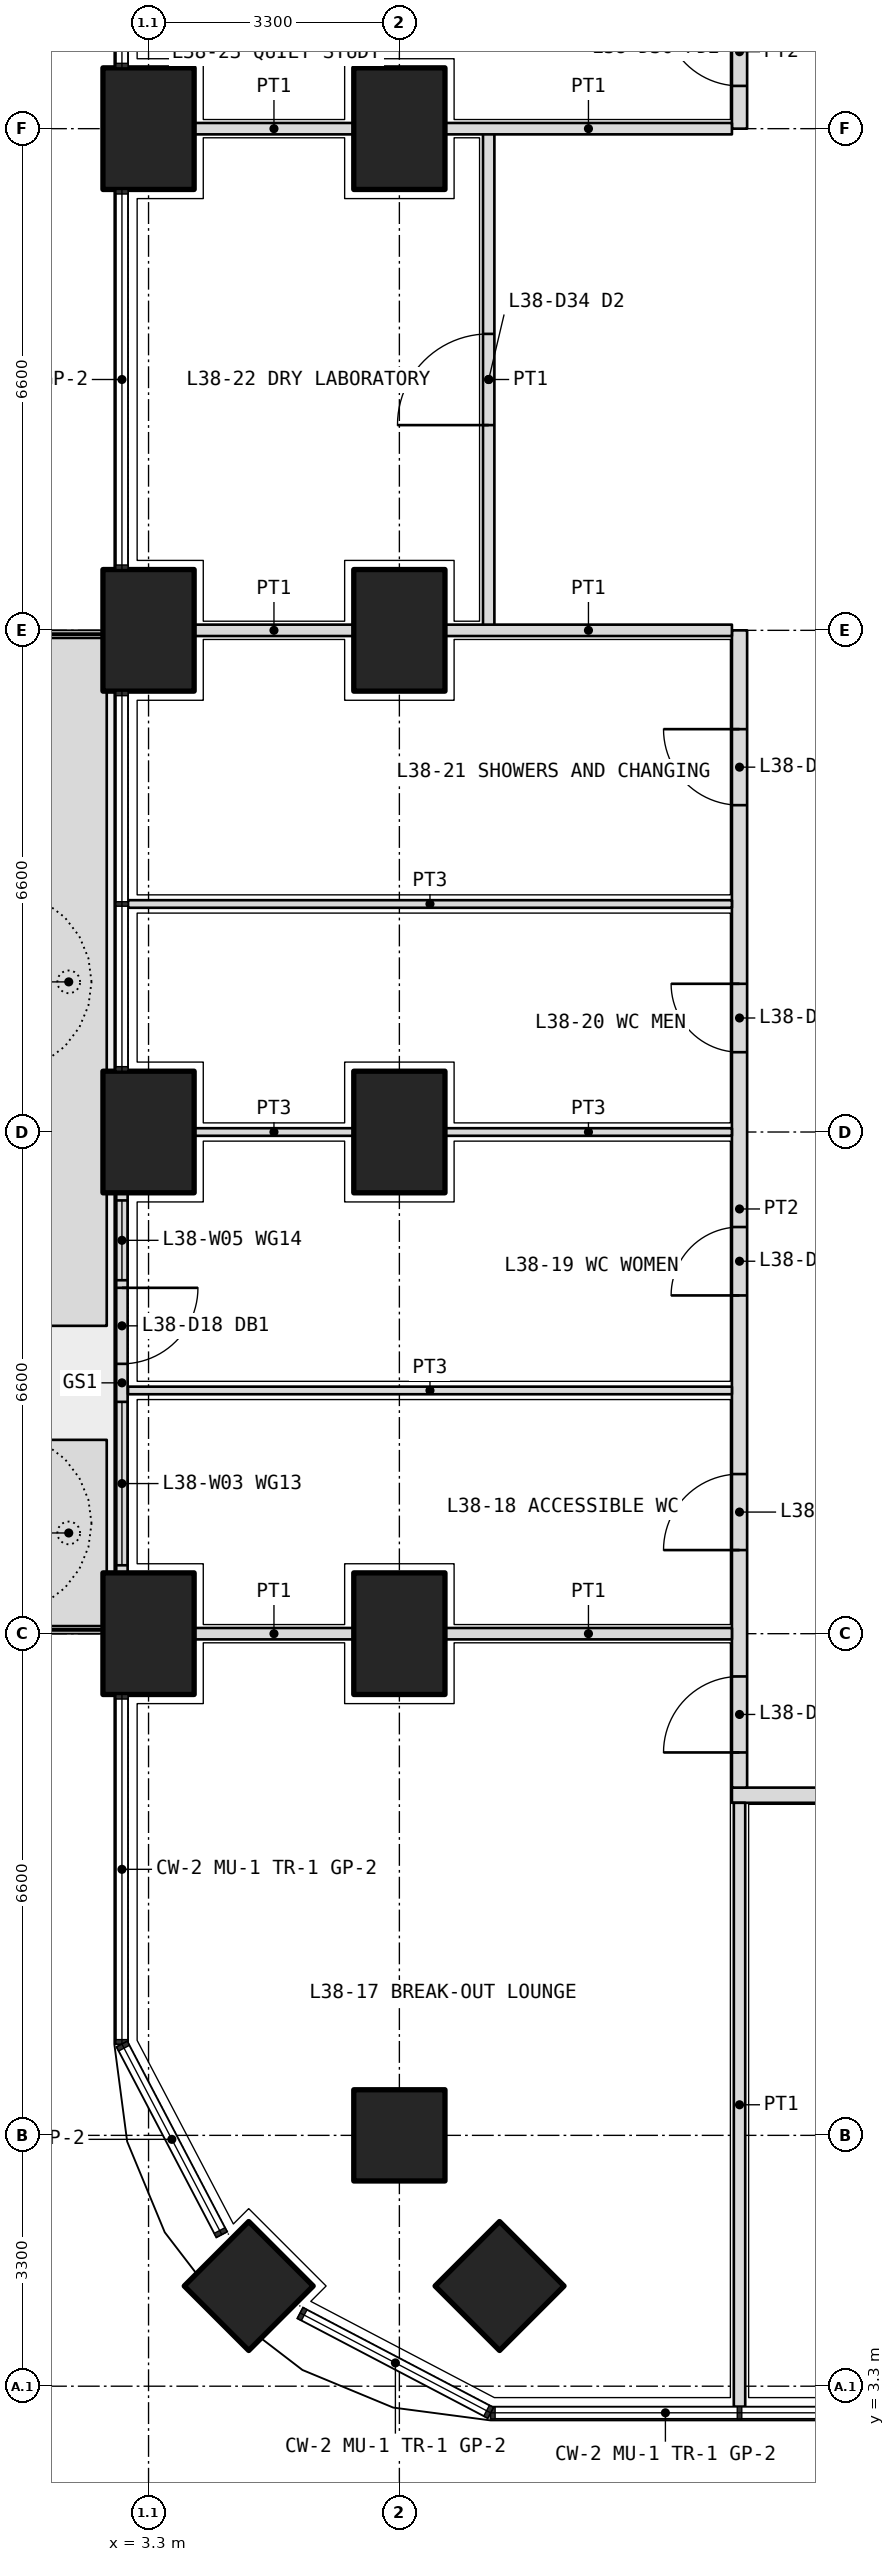
"""IFC4 building model, lengths in metres.
Left out: names, types, materials, properties, quantities, classifications, styles, units other than length and angle.
Written with IfcOpenShell. Run it as: python <this file> out.ifc"""

import sys

from ifc_helpers import new_model, si_unit, direction, frame, frame_2d, origin, origin_2d, place, context, subcontext, project, spatial, polyline, rectangle, outline, extrude, element, fill, save


model = new_model("IFC4")
c1 = context("Model", 3, precision=1e-05, world=origin(), true_north=direction((0.0, 1.0)))
c2 = subcontext(c1, "Body", "Model", "MODEL_VIEW")
j1 = project(units=[si_unit("LENGTHUNIT", "METRE"), si_unit("PLANEANGLEUNIT", "RADIAN")], contexts=[c1])
p1 = place(None, origin())
s1 = spatial("IfcSite", under=j1, at=p1, CompositionType="ELEMENT")
p2 = place(p1, origin())
s2 = spatial("IfcBuilding", under=s1, at=p2, CompositionType="ELEMENT")
p3 = place(p2, frame((0.0, 0.0, 168.3)))
s3 = spatial("IfcBuildingStorey", under=s2, at=p3, CompositionType="ELEMENT", Elevation=168.3)
p4 = place(p3, frame((4.618, 4.618, 0.0), z_axis=(0.0, 0.0, 1.0), x_axis=(0.707106781187, 0.707106781187, 0.0)))
e1 = element("IfcColumn", 1, at=p4, inside=s3, PredefinedType="COLUMN", context=c2, shape_type="SweptSolid", body=[
    extrude(rectangle(XDim=1.2, YDim=1.2, at=origin_2d()), origin(), (0.0, 0.0, 1.0), 4.2),
])
for number, where, z_axis, x_axis in (
    (2, (3.3, 13.2, 0.0), (0.0, 0.0, 1.0), (0.0, 1.0, 0.0)),
    (3, (3.3, 19.8, 0.0), (0.0, 0.0, 1.0), (0.0, 1.0, 0.0)),
    (4, (3.3, 26.4, 0.0), (0.0, 0.0, 1.0), (0.0, 1.0, 0.0)),
    (5, (3.3, 33.0, 0.0), (0.0, 0.0, 1.0), (0.0, 1.0, 0.0)),
):
    element("IfcColumn", number, at=place(p3, frame(where, z_axis=z_axis, x_axis=x_axis)), inside=s3, PredefinedType="COLUMN", context=c2, shape_type="SweptSolid", body=[
        extrude(rectangle(XDim=1.6, YDim=1.2, at=origin_2d()), origin(), (0.0, 0.0, 1.0), 4.2),
    ])
for number, where, z_axis, x_axis in (
    (6, (6.6, 6.6, 0.0), (0.0, 0.0, 1.0), (1.0, 0.0, 0.0)),
    (7, (7.918, 4.618, 0.0), (0.0, 0.0, 1.0), (0.707, 0.707, 0.0)),
):
    element("IfcColumn", number, at=place(p3, frame(where, z_axis=z_axis, x_axis=x_axis)), inside=s3, PredefinedType="COLUMN", context=c2, shape_type="SweptSolid", body=[
        extrude(rectangle(XDim=1.2, YDim=1.2, at=origin_2d()), origin(), (0.0, 0.0, 1.0), 4.2),
    ])
for number, where, z_axis, x_axis in (
    (8, (6.6, 13.2, 0.0), (0.0, 0.0, 1.0), (0.0, 1.0, 0.0)),
    (9, (6.6, 19.8, 0.0), (0.0, 0.0, 1.0), (0.0, 1.0, 0.0)),
    (10, (6.6, 26.4, 0.0), (0.0, 0.0, 1.0), (0.0, 1.0, 0.0)),
    (11, (6.6, 33.0, 0.0), (0.0, 0.0, 1.0), (0.0, 1.0, 0.0)),
):
    element("IfcColumn", number, at=place(p3, frame(where, z_axis=z_axis, x_axis=x_axis)), inside=s3, PredefinedType="COLUMN", context=c2, shape_type="SweptSolid", body=[
        extrude(rectangle(XDim=1.6, YDim=1.2, at=origin_2d()), origin(), (0.0, 0.0, 1.0), 4.2),
    ])
p5 = place(p3, origin())
e12 = element("IfcWall", 12, at=p5, inside=s3, PredefinedType="USERDEFINED", context=c2, shape_type="SweptSolid", body=[
    extrude(outline(polyline([(1.75, 13.3), (2.75, 13.3), (2.75, 15.75), (1.75, 15.75), (1.75, 13.3)]), holes=[polyline([(1.9, 13.45), (2.6, 13.45), (2.6, 15.6), (1.9, 15.6), (1.9, 13.45)])]), origin(), (0.0, 0.0, 1.0), 1.05),
])
p6 = place(p3, origin())
e13 = element("IfcWall", 13, at=p6, inside=s3, PredefinedType="USERDEFINED", context=c2, shape_type="SweptSolid", body=[
    extrude(outline(polyline([(1.75, 17.25), (2.75, 17.25), (2.75, 26.3), (1.75, 26.3), (1.75, 17.25)]), holes=[polyline([(1.9, 17.4), (2.6, 17.4), (2.6, 26.15), (1.9, 26.15), (1.9, 17.4)])]), origin(), (0.0, 0.0, 1.0), 1.05),
])
p7 = place(p3, frame((2.95, 19.0, 0.0), z_axis=(0.0, 0.0, 1.0), x_axis=(0.0, -1.0, 0.0)))
e14 = element("IfcWall", 14, at=p7, inside=s3, PredefinedType="SOLIDWALL", context=c2, shape_type="SweptSolid", body=[
    extrude(rectangle(XDim=5.0, YDim=0.15, at=frame_2d((2.5, 0.0))), origin(), (0.0, 0.0, 1.0), 2.7),
])
p8 = place(p7, frame((1.25, 0.0, 0.0)))
e15 = element("IfcOpeningElement", 15, at=p8, cuts=e14, PredefinedType="OPENING", context=c2, shape_type="SweptSolid", body=[
    extrude(rectangle(XDim=1.0, YDim=2.4, at=frame_2d((0.5, 1.2))), frame((0.0, 0.085, 0.0), z_axis=(0.0, -1.0, 0.0), x_axis=(1.0, 0.0, 0.0)), (0.0, 0.0, 1.0), 0.17),
])
p9 = place(p7, frame((0.1, 0.0, 0.1)))
e16 = element("IfcOpeningElement", 16, at=p9, cuts=e14, PredefinedType="OPENING", context=c2, shape_type="SweptSolid", body=[
    extrude(rectangle(XDim=1.05, YDim=2.3, at=frame_2d((0.525, 1.15))), frame((0.0, 0.085, 0.0), z_axis=(0.0, -1.0, 0.0), x_axis=(1.0, 0.0, 0.0)), (0.0, 0.0, 1.0), 0.17),
])
p10 = place(p7, frame((2.75, 0.0, 0.1)))
e17 = element("IfcOpeningElement", 17, at=p10, cuts=e14, PredefinedType="OPENING", context=c2, shape_type="SweptSolid", body=[
    extrude(rectangle(XDim=2.15, YDim=2.3, at=frame_2d((1.075, 1.15))), frame((0.0, 0.085, 0.0), z_axis=(0.0, -1.0, 0.0), x_axis=(1.0, 0.0, 0.0)), (0.0, 0.0, 1.0), 0.17),
])
p11 = place(p3, frame((10.975, 11.075, 0.0), z_axis=(0.0, 0.0, 1.0), x_axis=(1.0, 0.0, 0.0)))
e18 = element("IfcWall", 18, at=p11, inside=s3, PredefinedType="PARTITIONING", context=c2, shape_type="SweptSolid", body=[
    extrude(rectangle(XDim=30.85, YDim=0.2, at=frame_2d((15.425, 0.0))), origin(), (0.0, 0.0, 1.0), 2.85),
])
p12 = place(p11, frame((7.262, 0.0, 0.0)))
e19 = element("IfcOpeningElement", 19, at=p12, cuts=e18, PredefinedType="OPENING", context=c2, shape_type="SweptSolid", body=[
    extrude(rectangle(XDim=1.0, YDim=2.1, at=frame_2d((0.5, 1.05))), frame((0.0, 0.11, 0.0), z_axis=(0.0, -1.0, 0.0), x_axis=(1.0, 0.0, 0.0)), (0.0, 0.0, 1.0), 0.22),
])
p13 = place(p11, frame((16.475, 0.0, 0.0)))
e20 = element("IfcOpeningElement", 20, at=p13, cuts=e18, PredefinedType="OPENING", context=c2, shape_type="SweptSolid", body=[
    extrude(rectangle(XDim=1.2, YDim=2.1, at=frame_2d((0.6, 1.05))), frame((0.0, 0.11, 0.0), z_axis=(0.0, -1.0, 0.0), x_axis=(1.0, 0.0, 0.0)), (0.0, 0.0, 1.0), 0.22),
])
p14 = place(p11, frame((21.525, 0.0, 0.0)))
e21 = element("IfcOpeningElement", 21, at=p14, cuts=e18, PredefinedType="OPENING", context=c2, shape_type="SweptSolid", body=[
    extrude(rectangle(XDim=1.0, YDim=2.1, at=frame_2d((0.5, 1.05))), frame((0.0, 0.11, 0.0), z_axis=(0.0, -1.0, 0.0), x_axis=(1.0, 0.0, 0.0)), (0.0, 0.0, 1.0), 0.22),
])
p15 = place(p11, frame((26.375, 0.0, 0.0)))
e22 = element("IfcOpeningElement", 22, at=p15, cuts=e18, PredefinedType="OPENING", context=c2, shape_type="SweptSolid", body=[
    extrude(rectangle(XDim=1.2, YDim=2.1, at=frame_2d((0.6, 1.05))), frame((0.0, 0.11, 0.0), z_axis=(0.0, -1.0, 0.0), x_axis=(1.0, 0.0, 0.0)), (0.0, 0.0, 1.0), 0.22),
])
p16 = place(p11, frame((29.188, 0.0, 0.0)))
e23 = element("IfcOpeningElement", 23, at=p16, cuts=e18, PredefinedType="OPENING", context=c2, shape_type="SweptSolid", body=[
    extrude(rectangle(XDim=1.0, YDim=2.1, at=frame_2d((0.5, 1.05))), frame((0.0, 0.11, 0.0), z_axis=(0.0, -1.0, 0.0), x_axis=(1.0, 0.0, 0.0)), (0.0, 0.0, 1.0), 0.22),
])
p17 = place(p3, frame((11.075, 11.175, 0.0), z_axis=(0.0, 0.0, 1.0), x_axis=(0.0, 1.0, 0.0)))
e24 = element("IfcWall", 24, at=p17, inside=s3, PredefinedType="PARTITIONING", context=c2, shape_type="SweptSolid", body=[
    extrude(rectangle(XDim=15.225, YDim=0.2, at=frame_2d((7.612, 0.0))), origin(), (0.0, 0.0, 1.0), 2.85),
])
p18 = place(p17, frame((0.462, 0.0, 0.0)))
e25 = element("IfcOpeningElement", 25, at=p18, cuts=e24, PredefinedType="OPENING", context=c2, shape_type="SweptSolid", body=[
    extrude(rectangle(XDim=1.0, YDim=2.1, at=frame_2d((0.5, 1.05))), frame((0.0, 0.11, 0.0), z_axis=(0.0, -1.0, 0.0), x_axis=(1.0, 0.0, 0.0)), (0.0, 0.0, 1.0), 0.22),
])
p19 = place(p17, frame((3.125, 0.0, 0.0)))
e26 = element("IfcOpeningElement", 26, at=p19, cuts=e24, PredefinedType="OPENING", context=c2, shape_type="SweptSolid", body=[
    extrude(rectangle(XDim=1.0, YDim=2.1, at=frame_2d((0.5, 1.05))), frame((0.0, 0.11, 0.0), z_axis=(0.0, -1.0, 0.0), x_axis=(1.0, 0.0, 0.0)), (0.0, 0.0, 1.0), 0.22),
])
p20 = place(p17, frame((6.475, 0.0, 0.0)))
e27 = element("IfcOpeningElement", 27, at=p20, cuts=e24, PredefinedType="OPENING", context=c2, shape_type="SweptSolid", body=[
    extrude(rectangle(XDim=0.9, YDim=2.1, at=frame_2d((0.45, 1.05))), frame((0.0, 0.11, 0.0), z_axis=(0.0, -1.0, 0.0), x_axis=(1.0, 0.0, 0.0)), (0.0, 0.0, 1.0), 0.22),
])
p21 = place(p17, frame((9.675, 0.0, 0.0)))
e28 = element("IfcOpeningElement", 28, at=p21, cuts=e24, PredefinedType="OPENING", context=c2, shape_type="SweptSolid", body=[
    extrude(rectangle(XDim=0.9, YDim=2.1, at=frame_2d((0.45, 1.05))), frame((0.0, 0.11, 0.0), z_axis=(0.0, -1.0, 0.0), x_axis=(1.0, 0.0, 0.0)), (0.0, 0.0, 1.0), 0.22),
])
p22 = place(p17, frame((12.925, 0.0, 0.0)))
e29 = element("IfcOpeningElement", 29, at=p22, cuts=e24, PredefinedType="OPENING", context=c2, shape_type="SweptSolid", body=[
    extrude(rectangle(XDim=1.0, YDim=2.1, at=frame_2d((0.5, 1.05))), frame((0.0, 0.11, 0.0), z_axis=(0.0, -1.0, 0.0), x_axis=(1.0, 0.0, 0.0)), (0.0, 0.0, 1.0), 0.22),
])
p23 = place(p3, frame((11.075, 33.0, 0.0), z_axis=(0.0, 0.0, 1.0), x_axis=(0.0, 1.0, 0.0)))
e30 = element("IfcWall", 30, at=p23, inside=s3, PredefinedType="PARTITIONING", context=c2, shape_type="SweptSolid", body=[
    extrude(rectangle(XDim=2.025, YDim=0.2, at=frame_2d((1.012, 0.0))), origin(), (0.0, 0.0, 1.0), 2.85),
])
p24 = place(p23, frame((0.562, 0.0, 0.0)))
e31 = element("IfcOpeningElement", 31, at=p24, cuts=e30, PredefinedType="OPENING", context=c2, shape_type="SweptSolid", body=[
    extrude(rectangle(XDim=1.0, YDim=2.1, at=frame_2d((0.5, 1.05))), frame((0.0, 0.11, 0.0), z_axis=(0.0, -1.0, 0.0), x_axis=(1.0, 0.0, 0.0)), (0.0, 0.0, 1.0), 0.22),
])
p25 = place(p3, frame((11.075, 3.03, 0.0), z_axis=(0.0, 0.0, 1.0), x_axis=(0.0, 1.0, 0.0)))
e32 = element("IfcWall", 32, at=p25, inside=s3, PredefinedType="PARTITIONING", context=c2, shape_type="SweptSolid", body=[
    extrude(rectangle(XDim=7.945, YDim=0.15, at=frame_2d((3.973, 0.0))), origin(), (0.0, 0.0, 1.0), 2.7),
])
p26 = place(p3, frame((3.03, 16.4, 0.0), z_axis=(0.0, 0.0, 1.0), x_axis=(1.0, 0.0, 0.0)))
e33 = element("IfcWall", 33, at=p26, inside=s3, PredefinedType="PARTITIONING", context=c2, shape_type="SweptSolid", body=[
    extrude(rectangle(XDim=7.945, YDim=0.1, at=frame_2d((3.973, 0.0))), origin(), (0.0, 0.0, 1.0), 2.7),
])
p27 = place(p3, frame((3.9, 19.8, 0.0), z_axis=(0.0, 0.0, 1.0), x_axis=(1.0, 0.0, 0.0)))
e34 = element("IfcWall", 34, at=p27, inside=s3, PredefinedType="PARTITIONING", context=c2, shape_type="SweptSolid", body=[
    extrude(rectangle(XDim=2.1, YDim=0.1, at=frame_2d((1.05, 0.0))), origin(), (0.0, 0.0, 1.0), 2.85),
])
p28 = place(p3, frame((7.2, 19.8, 0.0), z_axis=(0.0, 0.0, 1.0), x_axis=(1.0, 0.0, 0.0)))
e35 = element("IfcWall", 35, at=p28, inside=s3, PredefinedType="PARTITIONING", context=c2, shape_type="SweptSolid", body=[
    extrude(rectangle(XDim=3.775, YDim=0.1, at=frame_2d((1.888, 0.0))), origin(), (0.0, 0.0, 1.0), 2.85),
])
p29 = place(p3, frame((3.03, 22.8, 0.0), z_axis=(0.0, 0.0, 1.0), x_axis=(1.0, 0.0, 0.0)))
e36 = element("IfcWall", 36, at=p29, inside=s3, PredefinedType="PARTITIONING", context=c2, shape_type="SweptSolid", body=[
    extrude(rectangle(XDim=7.945, YDim=0.1, at=frame_2d((3.973, 0.0))), origin(), (0.0, 0.0, 1.0), 2.7),
])
p30 = place(p3, frame((7.775, 26.4, 0.0), z_axis=(0.0, 0.0, 1.0), x_axis=(0.0, 1.0, 0.0)))
e37 = element("IfcWall", 37, at=p30, inside=s3, PredefinedType="PARTITIONING", context=c2, shape_type="SweptSolid", body=[
    extrude(rectangle(XDim=6.6, YDim=0.15, at=frame_2d((3.3, 0.0))), origin(), (0.0, 0.0, 1.0), 2.85),
])
p31 = place(p30, frame((2.7, 0.0, 0.0)))
e38 = element("IfcOpeningElement", 38, at=p31, cuts=e37, PredefinedType="OPENING", context=c2, shape_type="SweptSolid", body=[
    extrude(rectangle(XDim=1.2, YDim=2.1, at=frame_2d((0.6, 1.05))), frame((0.0, 0.085, 0.0), z_axis=(0.0, -1.0, 0.0), x_axis=(1.0, 0.0, 0.0)), (0.0, 0.0, 1.0), 0.17),
])
p32 = place(p3, frame((3.9, 13.2, 0.0), z_axis=(0.0, 0.0, 1.0), x_axis=(1.0, 0.0, 0.0)))
e39 = element("IfcWall", 39, at=p32, inside=s3, PredefinedType="PARTITIONING", context=c2, shape_type="SweptSolid", body=[
    extrude(rectangle(XDim=2.1, YDim=0.15, at=frame_2d((1.05, 0.0))), origin(), (0.0, 0.0, 1.0), 2.85),
])
p33 = place(p3, frame((7.2, 13.2, 0.0), z_axis=(0.0, 0.0, 1.0), x_axis=(1.0, 0.0, 0.0)))
e40 = element("IfcWall", 40, at=p33, inside=s3, PredefinedType="PARTITIONING", context=c2, shape_type="SweptSolid", body=[
    extrude(rectangle(XDim=3.775, YDim=0.15, at=frame_2d((1.888, 0.0))), origin(), (0.0, 0.0, 1.0), 2.85),
])
p34 = place(p3, frame((3.9, 26.4, 0.0), z_axis=(0.0, 0.0, 1.0), x_axis=(1.0, 0.0, 0.0)))
e41 = element("IfcWall", 41, at=p34, inside=s3, PredefinedType="PARTITIONING", context=c2, shape_type="SweptSolid", body=[
    extrude(rectangle(XDim=2.1, YDim=0.15, at=frame_2d((1.05, 0.0))), origin(), (0.0, 0.0, 1.0), 2.85),
])
p35 = place(p3, frame((7.2, 26.4, 0.0), z_axis=(0.0, 0.0, 1.0), x_axis=(1.0, 0.0, 0.0)))
e42 = element("IfcWall", 42, at=p35, inside=s3, PredefinedType="PARTITIONING", context=c2, shape_type="SweptSolid", body=[
    extrude(rectangle(XDim=3.775, YDim=0.15, at=frame_2d((1.888, 0.0))), origin(), (0.0, 0.0, 1.0), 2.85),
])
p36 = place(p3, frame((3.9, 33.0, 0.0), z_axis=(0.0, 0.0, 1.0), x_axis=(1.0, 0.0, 0.0)))
e43 = element("IfcWall", 43, at=p36, inside=s3, PredefinedType="PARTITIONING", context=c2, shape_type="SweptSolid", body=[
    extrude(rectangle(XDim=2.1, YDim=0.15, at=frame_2d((1.05, 0.0))), origin(), (0.0, 0.0, 1.0), 2.85),
])
p37 = place(p3, frame((7.2, 33.0, 0.0), z_axis=(0.0, 0.0, 1.0), x_axis=(1.0, 0.0, 0.0)))
e44 = element("IfcWall", 44, at=p37, inside=s3, PredefinedType="PARTITIONING", context=c2, shape_type="SweptSolid", body=[
    extrude(rectangle(XDim=3.775, YDim=0.15, at=frame_2d((1.888, 0.0))), origin(), (0.0, 0.0, 1.0), 2.85),
])
p38 = place(p8, origin())
e45 = element("IfcDoor", 45, at=p38, inside=s3, OperationType="SINGLE_SWING_LEFT", PredefinedType="DOOR", context=c2, shape_type="SweptSolid", body=[
    extrude(rectangle(XDim=1.0, YDim=2.4, at=frame_2d((0.5, 1.2))), frame((0.0, 0.025, 0.0), z_axis=(0.0, -1.0, 0.0), x_axis=(1.0, 0.0, 0.0)), (0.0, 0.0, 1.0), 0.05),
])
fill(e15, e45)
p39 = place(p9, origin())
e46 = element("IfcWindow", 46, at=p39, inside=s3, PartitioningType="SINGLE_PANEL", PredefinedType="WINDOW", context=c2, shape_type="SweptSolid", body=[
    extrude(rectangle(XDim=1.05, YDim=2.3, at=frame_2d((0.525, 1.15))), frame((0.0, 0.03, 0.0), z_axis=(0.0, -1.0, 0.0), x_axis=(1.0, 0.0, 0.0)), (0.0, 0.0, 1.0), 0.06),
])
fill(e16, e46)
p40 = place(p10, origin())
e47 = element("IfcWindow", 47, at=p40, inside=s3, PartitioningType="SINGLE_PANEL", PredefinedType="WINDOW", context=c2, shape_type="SweptSolid", body=[
    extrude(rectangle(XDim=2.15, YDim=2.3, at=frame_2d((1.075, 1.15))), frame((0.0, 0.03, 0.0), z_axis=(0.0, -1.0, 0.0), x_axis=(1.0, 0.0, 0.0)), (0.0, 0.0, 1.0), 0.06),
])
fill(e17, e47)
p41 = place(p18, origin())
e48 = element("IfcDoor", 48, at=p41, inside=s3, OperationType="SINGLE_SWING_LEFT", PredefinedType="DOOR", context=c2, shape_type="SweptSolid", body=[
    extrude(rectangle(XDim=1.0, YDim=2.1, at=frame_2d((0.5, 1.05))), frame((0.0, 0.025, 0.0), z_axis=(0.0, -1.0, 0.0), x_axis=(1.0, 0.0, 0.0)), (0.0, 0.0, 1.0), 0.05),
])
fill(e25, e48)
p42 = place(p19, origin())
e49 = element("IfcDoor", 49, at=p42, inside=s3, OperationType="SINGLE_SWING_LEFT", PredefinedType="DOOR", context=c2, shape_type="SweptSolid", body=[
    extrude(rectangle(XDim=1.0, YDim=2.1, at=frame_2d((0.5, 1.05))), frame((0.0, 0.025, 0.0), z_axis=(0.0, -1.0, 0.0), x_axis=(1.0, 0.0, 0.0)), (0.0, 0.0, 1.0), 0.05),
])
fill(e26, e49)
p43 = place(p20, origin())
e50 = element("IfcDoor", 50, at=p43, inside=s3, OperationType="SINGLE_SWING_LEFT", PredefinedType="DOOR", context=c2, shape_type="SweptSolid", body=[
    extrude(rectangle(XDim=0.9, YDim=2.1, at=frame_2d((0.45, 1.05))), frame((0.0, 0.025, 0.0), z_axis=(0.0, -1.0, 0.0), x_axis=(1.0, 0.0, 0.0)), (0.0, 0.0, 1.0), 0.05),
])
fill(e27, e50)
p44 = place(p21, origin())
e51 = element("IfcDoor", 51, at=p44, inside=s3, OperationType="SINGLE_SWING_RIGHT", PredefinedType="DOOR", context=c2, shape_type="SweptSolid", body=[
    extrude(rectangle(XDim=0.9, YDim=2.1, at=frame_2d((0.45, 1.05))), frame((0.0, 0.025, 0.0), z_axis=(0.0, -1.0, 0.0), x_axis=(1.0, 0.0, 0.0)), (0.0, 0.0, 1.0), 0.05),
])
fill(e28, e51)
p45 = place(p22, origin())
e52 = element("IfcDoor", 52, at=p45, inside=s3, OperationType="SINGLE_SWING_RIGHT", PredefinedType="DOOR", context=c2, shape_type="SweptSolid", body=[
    extrude(rectangle(XDim=1.0, YDim=2.1, at=frame_2d((0.5, 1.05))), frame((0.0, 0.025, 0.0), z_axis=(0.0, -1.0, 0.0), x_axis=(1.0, 0.0, 0.0)), (0.0, 0.0, 1.0), 0.05),
])
fill(e29, e52)
p46 = place(p31, origin())
e53 = element("IfcDoor", 53, at=p46, inside=s3, OperationType="DOUBLE_DOOR_SINGLE_SWING", PredefinedType="DOOR", context=c2, shape_type="SweptSolid", body=[
    extrude(rectangle(XDim=1.2, YDim=2.1, at=frame_2d((0.6, 1.05))), frame((0.0, 0.025, 0.0), z_axis=(0.0, -1.0, 0.0), x_axis=(1.0, 0.0, 0.0)), (0.0, 0.0, 1.0), 0.05),
])
fill(e38, e53)
p47 = place(p24, origin())
e54 = element("IfcDoor", 54, at=p47, inside=s3, OperationType="SINGLE_SWING_RIGHT", PredefinedType="DOOR", context=c2, shape_type="SweptSolid", body=[
    extrude(rectangle(XDim=1.0, YDim=2.1, at=frame_2d((0.5, 1.05))), frame((0.0, 0.025, 0.0), z_axis=(0.0, -1.0, 0.0), x_axis=(1.0, 0.0, 0.0)), (0.0, 0.0, 1.0), 0.05),
])
fill(e31, e54)
save(model, sys.argv[1])
